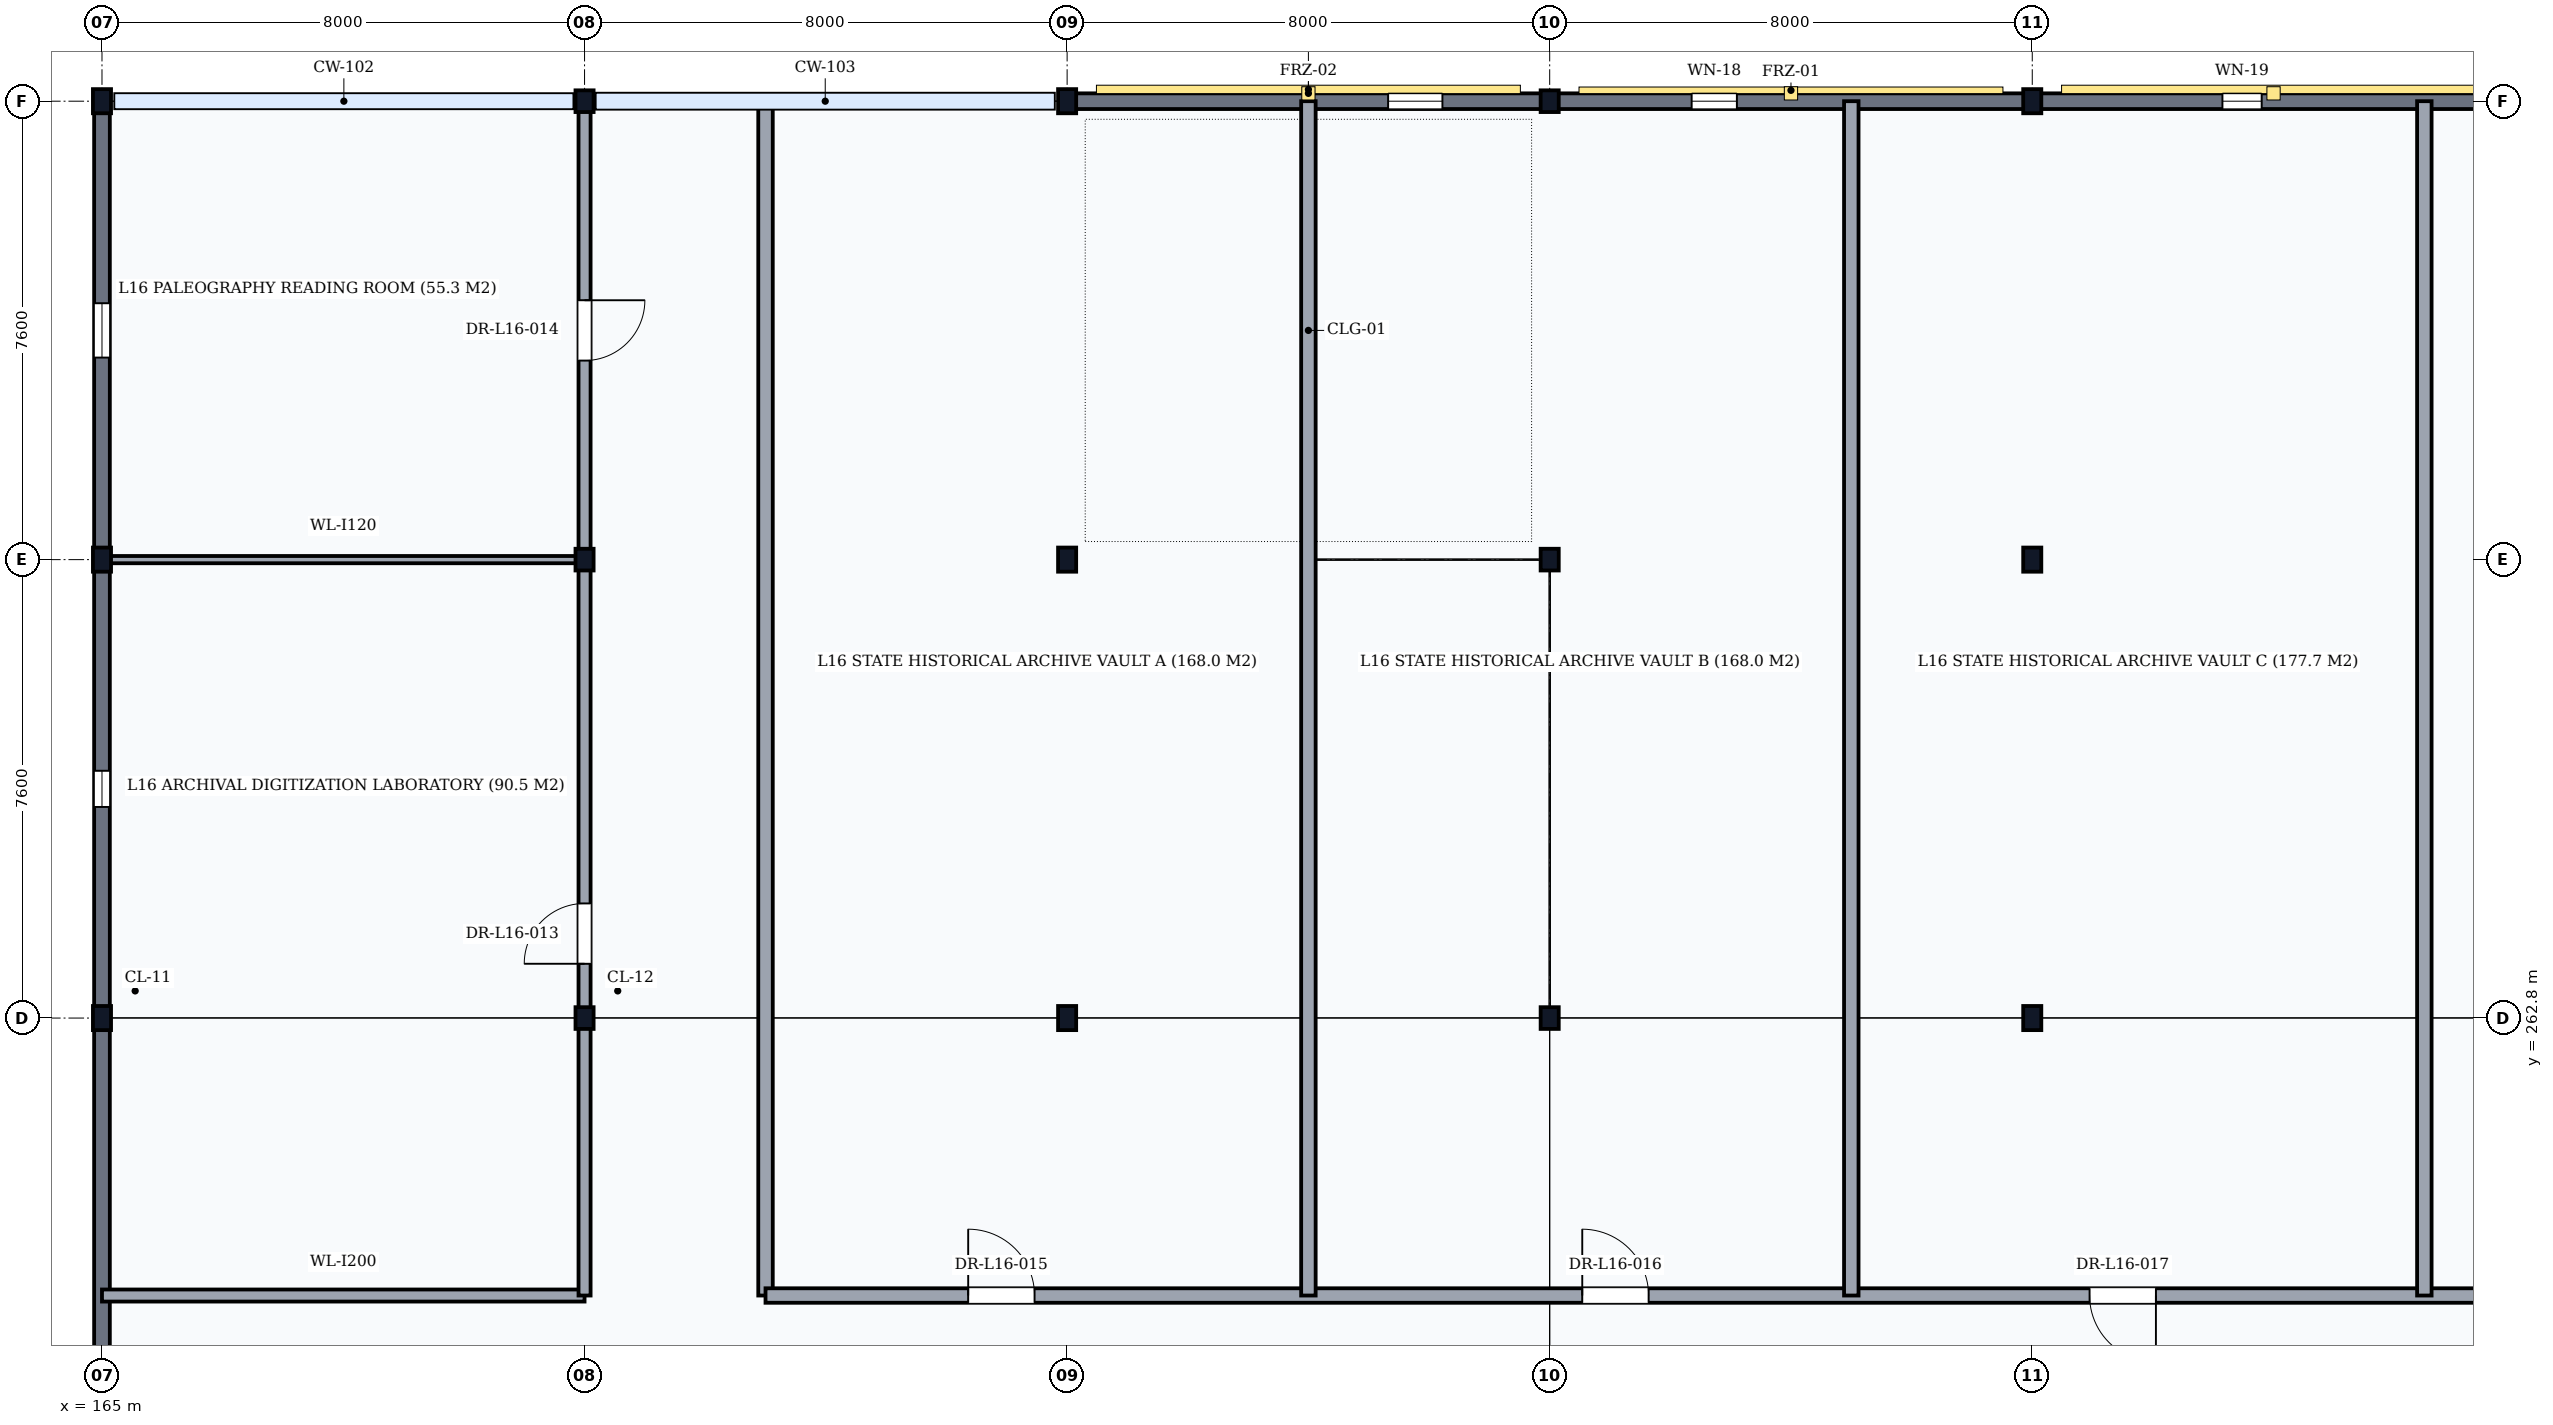
"""IFC4 building model, lengths in metres.
Left out: names, types, materials, properties, quantities, classifications, styles, units other than length and angle.
Written with IfcOpenShell. Run it as: python <this file> out.ifc"""

import sys

from ifc_helpers import new_model, si_unit, direction, frame, frame_2d, origin, origin_2d, place, context, subcontext, project, spatial, rectangle, i_section, extrude, element, fill, save


model = new_model("IFC4")
c1 = context("Model", 3, precision=1e-05, world=origin(), true_north=direction((0.0, 1.0)))
c2 = subcontext(c1, "Body", "Model", "MODEL_VIEW")
j1 = project(units=[si_unit("LENGTHUNIT", "METRE"), si_unit("PLANEANGLEUNIT", "RADIAN")], contexts=[c1])
p1 = place(None, origin())
s1 = spatial("IfcSite", under=j1, at=p1, CompositionType="ELEMENT")
p2 = place(p1, origin())
s2 = spatial("IfcBuilding", under=s1, at=p2, CompositionType="ELEMENT")
p3 = place(p2, frame((0.0, 0.0, 63.9)))
s3 = spatial("IfcBuildingStorey", under=s2, at=p3, CompositionType="ELEMENT", Elevation=63.9)
for number, where, z_axis, x_axis in (
    (1, (165.0, 262.8, 0.0), (0.0, 0.0, 1.0), (1.0, 0.0, 0.0)),
    (2, (165.0, 270.4, 0.0), (0.0, 0.0, 1.0), (1.0, 0.0, 0.0)),
    (3, (165.0, 278.0, 0.0), (0.0, 0.0, 1.0), (1.0, 0.0, 0.0)),
):
    element("IfcColumn", number, at=place(p3, frame(where, z_axis=z_axis, x_axis=x_axis)), inside=s3, PredefinedType="COLUMN", context=c2, shape_type="SweptSolid", body=[
        extrude(i_section(OverallWidth=0.3, OverallDepth=0.4, WebThickness=0.013, FlangeThickness=0.024, FilletRadius=0.027, at=origin_2d()), origin(), (0.0, 0.0, 1.0), 3.9),
    ])
for number, where, z_axis, x_axis in (
    (4, (173.0, 262.8, 0.0), (0.0, 0.0, 1.0), (1.0, 0.0, 0.0)),
    (5, (173.0, 270.4, 0.0), (0.0, 0.0, 1.0), (1.0, 0.0, 0.0)),
    (6, (173.0, 278.0, 0.0), (0.0, 0.0, 1.0), (1.0, 0.0, 0.0)),
):
    element("IfcColumn", number, at=place(p3, frame(where, z_axis=z_axis, x_axis=x_axis)), inside=s3, PredefinedType="COLUMN", context=c2, shape_type="SweptSolid", body=[
        extrude(i_section(OverallWidth=0.3, OverallDepth=0.36, WebThickness=0.012, FlangeThickness=0.022, FilletRadius=0.027, at=origin_2d()), origin(), (0.0, 0.0, 1.0), 3.9),
    ])
for number, where, z_axis, x_axis in (
    (7, (181.0, 262.8, 0.0), (0.0, 0.0, 1.0), (1.0, 0.0, 0.0)),
    (8, (181.0, 270.4, 0.0), (0.0, 0.0, 1.0), (1.0, 0.0, 0.0)),
    (9, (181.0, 278.0, 0.0), (0.0, 0.0, 1.0), (1.0, 0.0, 0.0)),
):
    element("IfcColumn", number, at=place(p3, frame(where, z_axis=z_axis, x_axis=x_axis)), inside=s3, PredefinedType="COLUMN", context=c2, shape_type="SweptSolid", body=[
        extrude(i_section(OverallWidth=0.3, OverallDepth=0.4, WebThickness=0.013, FlangeThickness=0.024, FilletRadius=0.027, at=origin_2d()), origin(), (0.0, 0.0, 1.0), 3.9),
    ])
for number, where, z_axis, x_axis in (
    (10, (189.0, 262.8, 0.0), (0.0, 0.0, 1.0), (1.0, 0.0, 0.0)),
    (11, (189.0, 270.4, 0.0), (0.0, 0.0, 1.0), (1.0, 0.0, 0.0)),
    (12, (189.0, 278.0, 0.0), (0.0, 0.0, 1.0), (1.0, 0.0, 0.0)),
):
    element("IfcColumn", number, at=place(p3, frame(where, z_axis=z_axis, x_axis=x_axis)), inside=s3, PredefinedType="COLUMN", context=c2, shape_type="SweptSolid", body=[
        extrude(i_section(OverallWidth=0.3, OverallDepth=0.36, WebThickness=0.012, FlangeThickness=0.022, FilletRadius=0.027, at=origin_2d()), origin(), (0.0, 0.0, 1.0), 3.9),
    ])
for number, where, z_axis, x_axis in (
    (13, (197.0, 262.8, 0.0), (0.0, 0.0, 1.0), (1.0, 0.0, 0.0)),
    (14, (197.0, 270.4, 0.0), (0.0, 0.0, 1.0), (1.0, 0.0, 0.0)),
    (15, (197.0, 278.0, 0.0), (0.0, 0.0, 1.0), (1.0, 0.0, 0.0)),
):
    element("IfcColumn", number, at=place(p3, frame(where, z_axis=z_axis, x_axis=x_axis)), inside=s3, PredefinedType="COLUMN", context=c2, shape_type="SweptSolid", body=[
        extrude(i_section(OverallWidth=0.3, OverallDepth=0.4, WebThickness=0.013, FlangeThickness=0.024, FilletRadius=0.027, at=origin_2d()), origin(), (0.0, 0.0, 1.0), 3.9),
    ])
p4 = place(p3, frame((181.006, 278.0, 0.0), z_axis=(0.0, 0.0, 1.0), x_axis=(1.0, 0.0, 0.0)))
e16 = element("IfcWall", 16, at=p4, inside=s3, PredefinedType="SOLIDWALL", context=c2, shape_type="SweptSolid", body=[
    extrude(rectangle(XDim=7.988, YDim=0.26, at=frame_2d((3.994, 0.0))), origin(), (0.0, 0.0, 1.0), 3.388),
])
p5 = place(p4, frame((5.316, 0.0, 0.95)))
e17 = element("IfcOpeningElement", 17, at=p5, cuts=e16, PredefinedType="OPENING", context=c2, shape_type="SweptSolid", body=[
    extrude(rectangle(XDim=0.9, YDim=2.2, at=frame_2d((0.45, 1.1))), frame((0.0, 0.145, 0.0), z_axis=(0.0, -1.0, 0.0), x_axis=(1.0, 0.0, 0.0)), (0.0, 0.0, 1.0), 0.29),
])
p6 = place(p3, frame((189.006, 278.0, 0.0), z_axis=(0.0, 0.0, 1.0), x_axis=(1.0, 0.0, 0.0)))
e18 = element("IfcWall", 18, at=p6, inside=s3, PredefinedType="SOLIDWALL", context=c2, shape_type="SweptSolid", body=[
    extrude(rectangle(XDim=7.988, YDim=0.26, at=frame_2d((3.994, 0.0))), origin(), (0.0, 0.0, 1.0), 3.388),
])
p7 = place(p6, frame((2.347, 0.0, 0.95)))
e19 = element("IfcOpeningElement", 19, at=p7, cuts=e18, PredefinedType="OPENING", context=c2, shape_type="SweptSolid", body=[
    extrude(rectangle(XDim=0.75, YDim=2.0, at=frame_2d((0.375, 1.0))), frame((0.0, 0.145, 0.0), z_axis=(0.0, -1.0, 0.0), x_axis=(1.0, 0.0, 0.0)), (0.0, 0.0, 1.0), 0.29),
])
p8 = place(p3, frame((197.006, 278.0, 0.0), z_axis=(0.0, 0.0, 1.0), x_axis=(1.0, 0.0, 0.0)))
e20 = element("IfcWall", 20, at=p8, inside=s3, PredefinedType="SOLIDWALL", context=c2, shape_type="SweptSolid", body=[
    extrude(rectangle(XDim=7.988, YDim=0.26, at=frame_2d((3.994, 0.0))), origin(), (0.0, 0.0, 1.0), 3.388),
])
p9 = place(p8, frame((3.147, 0.0, 0.95)))
e21 = element("IfcOpeningElement", 21, at=p9, cuts=e20, PredefinedType="OPENING", context=c2, shape_type="SweptSolid", body=[
    extrude(rectangle(XDim=0.65, YDim=1.8, at=frame_2d((0.325, 0.9))), frame((0.0, 0.145, 0.0), z_axis=(0.0, -1.0, 0.0), x_axis=(1.0, 0.0, 0.0)), (0.0, 0.0, 1.0), 0.29),
])
p10 = place(p3, frame((165.0, 255.206, 0.0), z_axis=(0.0, 0.0, 1.0), x_axis=(0.0, 1.0, 0.0)))
e22 = element("IfcWall", 22, at=p10, inside=s3, PredefinedType="SOLIDWALL", context=c2, shape_type="SweptSolid", body=[
    extrude(rectangle(XDim=7.588, YDim=0.26, at=frame_2d((3.794, 0.0))), origin(), (0.0, 0.0, 1.0), 3.428),
])
p11 = place(p3, frame((165.0, 262.806, 0.0), z_axis=(0.0, 0.0, 1.0), x_axis=(0.0, 1.0, 0.0)))
e23 = element("IfcWall", 23, at=p11, inside=s3, PredefinedType="SOLIDWALL", context=c2, shape_type="SweptSolid", body=[
    extrude(rectangle(XDim=7.588, YDim=0.26, at=frame_2d((3.794, 0.0))), origin(), (0.0, 0.0, 1.0), 3.428),
])
p12 = place(p11, frame((3.494, 0.0, 0.95)))
e24 = element("IfcOpeningElement", 24, at=p12, cuts=e23, PredefinedType="OPENING", context=c2, shape_type="SweptSolid", body=[
    extrude(rectangle(XDim=0.6, YDim=1.5, at=frame_2d((0.3, 0.75))), frame((0.0, 0.145, 0.0), z_axis=(0.0, -1.0, 0.0), x_axis=(1.0, 0.0, 0.0)), (0.0, 0.0, 1.0), 0.29),
])
p13 = place(p3, frame((165.0, 270.406, 0.0), z_axis=(0.0, 0.0, 1.0), x_axis=(0.0, 1.0, 0.0)))
e25 = element("IfcWall", 25, at=p13, inside=s3, PredefinedType="SOLIDWALL", context=c2, shape_type="SweptSolid", body=[
    extrude(rectangle(XDim=7.588, YDim=0.26, at=frame_2d((3.794, 0.0))), origin(), (0.0, 0.0, 1.0), 3.428),
])
p14 = place(p13, frame((3.344, 0.0, 0.95)))
e26 = element("IfcOpeningElement", 26, at=p14, cuts=e25, PredefinedType="OPENING", context=c2, shape_type="SweptSolid", body=[
    extrude(rectangle(XDim=0.9, YDim=2.2, at=frame_2d((0.45, 1.1))), frame((0.0, 0.145, 0.0), z_axis=(0.0, -1.0, 0.0), x_axis=(1.0, 0.0, 0.0)), (0.0, 0.0, 1.0), 0.29),
])
p15 = place(p3, frame((165.0, 258.2, 0.0), z_axis=(0.0, 0.0, 1.0), x_axis=(1.0, 0.0, 0.0)))
e27 = element("IfcWall", 27, at=p15, inside=s3, PredefinedType="PARTITIONING", context=c2, shape_type="SweptSolid", body=[
    extrude(rectangle(XDim=8.0, YDim=0.2, at=frame_2d((4.0, 0.0))), origin(), (0.0, 0.0, 1.0), 3.7),
])
p16 = place(p3, frame((173.0, 258.2, 0.0), z_axis=(0.0, 0.0, 1.0), x_axis=(0.0, 1.0, 0.0)))
e28 = element("IfcWall", 28, at=p16, inside=s3, PredefinedType="PARTITIONING", context=c2, shape_type="SweptSolid", body=[
    extrude(rectangle(XDim=19.8, YDim=0.2, at=frame_2d((9.9, 0.0))), origin(), (0.0, 0.0, 1.0), 3.148),
])
p17 = place(p16, frame((5.5, 0.0, 0.0)))
e29 = element("IfcOpeningElement", 29, at=p17, cuts=e28, PredefinedType="OPENING", context=c2, shape_type="SweptSolid", body=[
    extrude(rectangle(XDim=1.0, YDim=2.1, at=frame_2d((0.5, 1.05))), frame((0.0, 0.115, 0.0), z_axis=(0.0, -1.0, 0.0), x_axis=(1.0, 0.0, 0.0)), (0.0, 0.0, 1.0), 0.23),
])
p18 = place(p16, frame((15.5, 0.0, 0.0)))
e30 = element("IfcOpeningElement", 30, at=p18, cuts=e28, PredefinedType="OPENING", context=c2, shape_type="SweptSolid", body=[
    extrude(rectangle(XDim=1.0, YDim=2.1, at=frame_2d((0.5, 1.05))), frame((0.0, 0.115, 0.0), z_axis=(0.0, -1.0, 0.0), x_axis=(1.0, 0.0, 0.0)), (0.0, 0.0, 1.0), 0.23),
])
p19 = place(p3, frame((165.0, 270.4, 0.0), z_axis=(0.0, 0.0, 1.0), x_axis=(1.0, 0.0, 0.0)))
e31 = element("IfcWall", 31, at=p19, inside=s3, PredefinedType="PARTITIONING", context=c2, shape_type="SweptSolid", body=[
    extrude(rectangle(XDim=8.0, YDim=0.12, at=frame_2d((4.0, 0.0))), origin(), (0.0, 0.0, 1.0), 3.148),
])
p20 = place(p3, frame((176.0, 258.2, 0.0), z_axis=(0.0, 0.0, 1.0), x_axis=(0.0, 1.0, 0.0)))
e32 = element("IfcWall", 32, at=p20, inside=s3, PredefinedType="PARTITIONING", context=c2, shape_type="SweptSolid", body=[
    extrude(rectangle(XDim=19.8, YDim=0.24, at=frame_2d((9.9, 0.0))), origin(), (0.0, 0.0, 1.0), 3.7),
])
p21 = place(p3, frame((176.0, 258.2, 0.0), z_axis=(0.0, 0.0, 1.0), x_axis=(1.0, 0.0, 0.0)))
e33 = element("IfcWall", 33, at=p21, inside=s3, PredefinedType="PARTITIONING", context=c2, shape_type="SweptSolid", body=[
    extrude(rectangle(XDim=37.0, YDim=0.24, at=frame_2d((18.5, 0.0))), origin(), (0.0, 0.0, 1.0), 3.7),
])
p22 = place(p21, frame((3.36, 0.0, 0.0)))
e34 = element("IfcOpeningElement", 34, at=p22, cuts=e33, PredefinedType="OPENING", context=c2, shape_type="SweptSolid", body=[
    extrude(rectangle(XDim=1.1, YDim=2.1, at=frame_2d((0.55, 1.05))), frame((0.0, 0.135, 0.0), z_axis=(0.0, -1.0, 0.0), x_axis=(1.0, 0.0, 0.0)), (0.0, 0.0, 1.0), 0.27),
])
p23 = place(p21, frame((13.54, 0.0, 0.0)))
e35 = element("IfcOpeningElement", 35, at=p23, cuts=e33, PredefinedType="OPENING", context=c2, shape_type="SweptSolid", body=[
    extrude(rectangle(XDim=1.1, YDim=2.1, at=frame_2d((0.55, 1.05))), frame((0.0, 0.135, 0.0), z_axis=(0.0, -1.0, 0.0), x_axis=(1.0, 0.0, 0.0)), (0.0, 0.0, 1.0), 0.27),
])
p24 = place(p21, frame((21.95, 0.0, 0.0)))
e36 = element("IfcOpeningElement", 36, at=p24, cuts=e33, PredefinedType="OPENING", context=c2, shape_type="SweptSolid", body=[
    extrude(rectangle(XDim=1.1, YDim=2.1, at=frame_2d((0.55, 1.05))), frame((0.0, 0.135, 0.0), z_axis=(0.0, -1.0, 0.0), x_axis=(1.0, 0.0, 0.0)), (0.0, 0.0, 1.0), 0.27),
])
p25 = place(p21, frame((31.45, 0.0, 0.0)))
e37 = element("IfcOpeningElement", 37, at=p25, cuts=e33, PredefinedType="OPENING", context=c2, shape_type="SweptSolid", body=[
    extrude(rectangle(XDim=1.1, YDim=2.1, at=frame_2d((0.55, 1.05))), frame((0.0, 0.135, 0.0), z_axis=(0.0, -1.0, 0.0), x_axis=(1.0, 0.0, 0.0)), (0.0, 0.0, 1.0), 0.27),
])
p26 = place(p3, frame((185.0, 258.2, 0.0), z_axis=(0.0, 0.0, 1.0), x_axis=(0.0, 1.0, 0.0)))
e38 = element("IfcWall", 38, at=p26, inside=s3, PredefinedType="PARTITIONING", context=c2, shape_type="SweptSolid", body=[
    extrude(rectangle(XDim=19.8, YDim=0.24, at=frame_2d((9.9, 0.0))), origin(), (0.0, 0.0, 1.0), 3.368),
])
for number, where, z_axis, x_axis in (
    (39, (194.0, 258.2, 0.0), (0.0, 0.0, 1.0), (0.0, 1.0, 0.0)),
    (40, (203.5, 258.2, 0.0), (0.0, 0.0, 1.0), (0.0, 1.0, 0.0)),
):
    element("IfcWall", number, at=place(p3, frame(where, z_axis=z_axis, x_axis=x_axis)), inside=s3, PredefinedType="PARTITIONING", context=c2, shape_type="SweptSolid", body=[
        extrude(rectangle(XDim=19.8, YDim=0.24, at=frame_2d((9.9, 0.0))), origin(), (0.0, 0.0, 1.0), 3.7),
    ])
p27 = place(p5, origin())
e41 = element("IfcWindow", 41, at=p27, inside=s3, PartitioningType="SINGLE_PANEL", PredefinedType="WINDOW", context=c2, shape_type="SweptSolid", body=[
    extrude(rectangle(XDim=0.9, YDim=2.2, at=frame_2d((0.45, 1.1))), frame((0.0, 0.03, 0.0), z_axis=(0.0, -1.0, 0.0), x_axis=(1.0, 0.0, 0.0)), (0.0, 0.0, 1.0), 0.06),
])
fill(e17, e41)
p28 = place(p7, origin())
e42 = element("IfcWindow", 42, at=p28, inside=s3, PartitioningType="SINGLE_PANEL", PredefinedType="WINDOW", context=c2, shape_type="SweptSolid", body=[
    extrude(rectangle(XDim=0.75, YDim=2.0, at=frame_2d((0.375, 1.0))), frame((0.0, 0.03, 0.0), z_axis=(0.0, -1.0, 0.0), x_axis=(1.0, 0.0, 0.0)), (0.0, 0.0, 1.0), 0.06),
])
fill(e19, e42)
p29 = place(p9, origin())
e43 = element("IfcWindow", 43, at=p29, inside=s3, PartitioningType="SINGLE_PANEL", PredefinedType="WINDOW", context=c2, shape_type="SweptSolid", body=[
    extrude(rectangle(XDim=0.65, YDim=1.8, at=frame_2d((0.325, 0.9))), frame((0.0, 0.03, 0.0), z_axis=(0.0, -1.0, 0.0), x_axis=(1.0, 0.0, 0.0)), (0.0, 0.0, 1.0), 0.06),
])
fill(e21, e43)
p30 = place(p12, origin())
e44 = element("IfcWindow", 44, at=p30, inside=s3, PartitioningType="SINGLE_PANEL", PredefinedType="WINDOW", context=c2, shape_type="SweptSolid", body=[
    extrude(rectangle(XDim=0.6, YDim=1.5, at=frame_2d((0.3, 0.75))), frame((0.0, 0.03, 0.0), z_axis=(0.0, -1.0, 0.0), x_axis=(1.0, 0.0, 0.0)), (0.0, 0.0, 1.0), 0.06),
])
fill(e24, e44)
p31 = place(p14, origin())
e45 = element("IfcWindow", 45, at=p31, inside=s3, PartitioningType="SINGLE_PANEL", PredefinedType="WINDOW", context=c2, shape_type="SweptSolid", body=[
    extrude(rectangle(XDim=0.9, YDim=2.2, at=frame_2d((0.45, 1.1))), frame((0.0, 0.03, 0.0), z_axis=(0.0, -1.0, 0.0), x_axis=(1.0, 0.0, 0.0)), (0.0, 0.0, 1.0), 0.06),
])
fill(e26, e45)
p32 = place(p17, origin())
e46 = element("IfcDoor", 46, at=p32, inside=s3, OperationType="SINGLE_SWING_LEFT", PredefinedType="DOOR", context=c2, shape_type="SweptSolid", body=[
    extrude(rectangle(XDim=1.0, YDim=2.1, at=frame_2d((0.5, 1.05))), frame((0.0, 0.025, 0.0), z_axis=(0.0, -1.0, 0.0), x_axis=(1.0, 0.0, 0.0)), (0.0, 0.0, 1.0), 0.05),
])
fill(e29, e46)
p33 = place(p18, origin())
e47 = element("IfcDoor", 47, at=p33, inside=s3, OperationType="SINGLE_SWING_RIGHT", PredefinedType="DOOR", context=c2, shape_type="SweptSolid", body=[
    extrude(rectangle(XDim=1.0, YDim=2.1, at=frame_2d((0.5, 1.05))), frame((0.0, 0.025, 0.0), z_axis=(0.0, -1.0, 0.0), x_axis=(1.0, 0.0, 0.0)), (0.0, 0.0, 1.0), 0.05),
])
fill(e30, e47)
p34 = place(p22, origin())
e48 = element("IfcDoor", 48, at=p34, inside=s3, OperationType="SINGLE_SWING_LEFT", PredefinedType="DOOR", context=c2, shape_type="SweptSolid", body=[
    extrude(rectangle(XDim=1.1, YDim=2.1, at=frame_2d((0.55, 1.05))), frame((0.0, 0.025, 0.0), z_axis=(0.0, -1.0, 0.0), x_axis=(1.0, 0.0, 0.0)), (0.0, 0.0, 1.0), 0.05),
])
fill(e34, e48)
p35 = place(p23, origin())
e49 = element("IfcDoor", 49, at=p35, inside=s3, OperationType="SINGLE_SWING_LEFT", PredefinedType="DOOR", context=c2, shape_type="SweptSolid", body=[
    extrude(rectangle(XDim=1.1, YDim=2.1, at=frame_2d((0.55, 1.05))), frame((0.0, 0.025, 0.0), z_axis=(0.0, -1.0, 0.0), x_axis=(1.0, 0.0, 0.0)), (0.0, 0.0, 1.0), 0.05),
])
fill(e35, e49)
p36 = place(p24, origin())
e50 = element("IfcDoor", 50, at=p36, inside=s3, OperationType="SINGLE_SWING_RIGHT", PredefinedType="DOOR", context=c2, shape_type="SweptSolid", body=[
    extrude(rectangle(XDim=1.1, YDim=2.1, at=frame_2d((0.55, 1.05))), frame((0.0, 0.025, 0.0), z_axis=(0.0, -1.0, 0.0), x_axis=(1.0, 0.0, 0.0)), (0.0, 0.0, 1.0), 0.05),
])
fill(e36, e50)
save(model, sys.argv[1])
